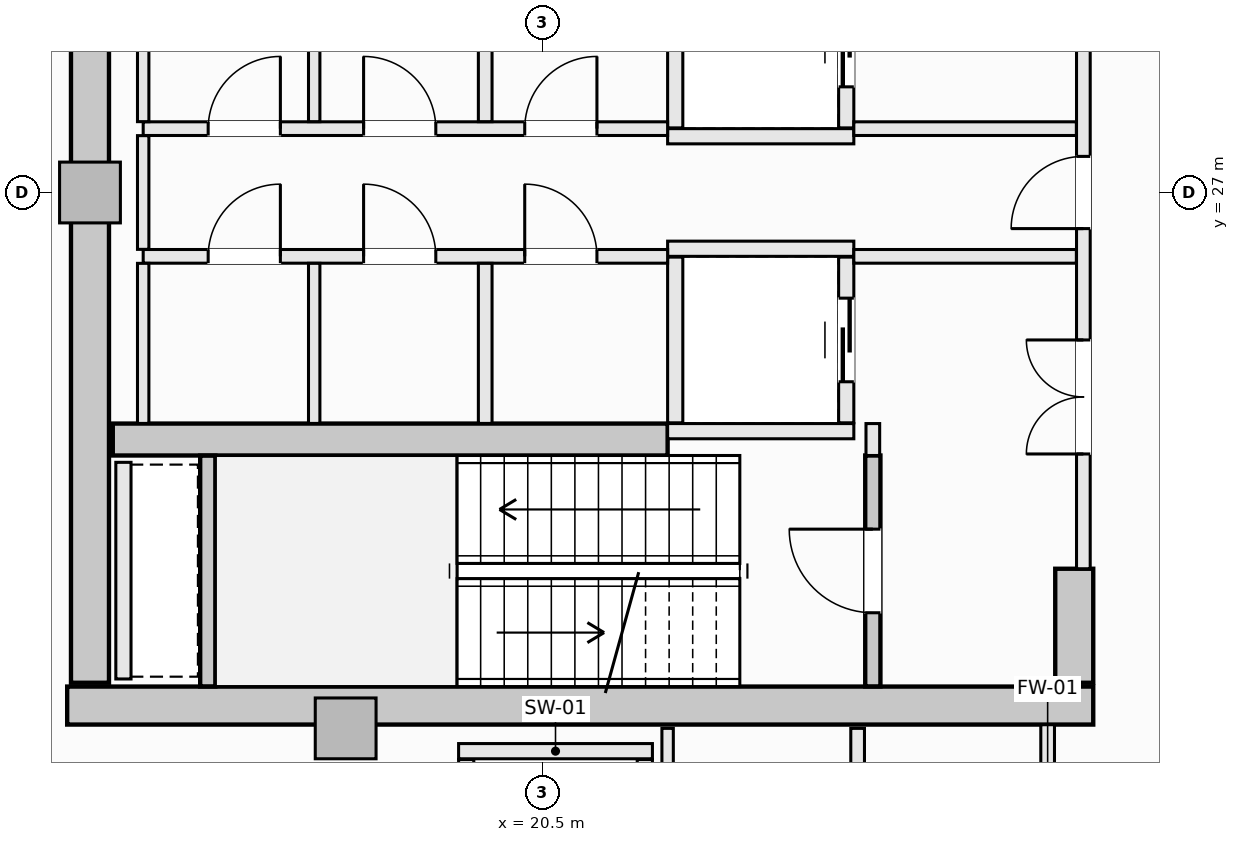
"""IFC4 building model, lengths in metres.
Left out: names, types, materials, properties, quantities, classifications, styles, units other than length and angle.
Written with IfcOpenShell. Run it as: python <this file> out.ifc"""

import sys

from ifc_helpers import new_model, si_unit, direction, frame, frame_2d, origin, origin_2d, place, context, subcontext, project, spatial, rectangle, extrude, element, fill, save


model = new_model("IFC4")
c1 = context("Model", 3, precision=1e-05, world=origin(), true_north=direction((0.0, 1.0)))
c2 = subcontext(c1, "Body", "Model", "MODEL_VIEW")
j1 = project(units=[si_unit("LENGTHUNIT", "METRE"), si_unit("PLANEANGLEUNIT", "RADIAN")], contexts=[c1])
p1 = place(None, origin())
s1 = spatial("IfcSite", under=j1, at=p1, CompositionType="ELEMENT")
p2 = place(p1, origin())
s2 = spatial("IfcBuilding", under=s1, at=p2, CompositionType="ELEMENT")
p3 = place(p2, frame((0.0, 0.0, 191.9)))
s3 = spatial("IfcBuildingStorey", under=s2, at=p3, CompositionType="ELEMENT", Elevation=191.9)
p4 = place(p3, frame((14.25, 20.25, -0.28), z_axis=(0.0, 0.0, 1.0), x_axis=(1.0, 0.0, 0.0)))
e1 = element("IfcWall", 1, at=p4, inside=s3, PredefinedType="SHEAR", context=c2, shape_type="SweptSolid", body=[
    extrude(rectangle(XDim=13.5, YDim=0.5, at=frame_2d((6.75, 0.0))), origin(), (0.0, 0.0, 1.0), 4.51),
])
p5 = place(p3, frame((14.55, 20.55, -0.28), z_axis=(0.0, 0.0, 1.0), x_axis=(0.0, 1.0, 0.0)))
e2 = element("IfcWall", 2, at=p5, inside=s3, PredefinedType="SHEAR", context=c2, shape_type="SweptSolid", body=[
    extrude(rectangle(XDim=12.9, YDim=0.5, at=frame_2d((6.45, 0.0))), origin(), (0.0, 0.0, 1.0), 4.51),
])
p6 = place(p3, frame((27.5, 20.55, -0.28), z_axis=(0.0, 0.0, 1.0), x_axis=(0.0, 1.0, 0.0)))
e3 = element("IfcWall", 3, at=p6, inside=s3, PredefinedType="SHEAR", context=c2, shape_type="SweptSolid", body=[
    extrude(rectangle(XDim=1.5, YDim=0.5, at=frame_2d((0.75, 0.0))), origin(), (0.0, 0.0, 1.0), 4.51),
])
p7 = place(p3, frame((14.85, 23.75, -0.28), z_axis=(0.0, 0.0, 1.0), x_axis=(1.0, 0.0, 0.0)))
e4 = element("IfcWall", 4, at=p7, inside=s3, PredefinedType="SHEAR", context=c2, shape_type="SweptSolid", body=[
    extrude(rectangle(XDim=7.3, YDim=0.42, at=frame_2d((3.65, 0.0))), origin(), (0.0, 0.0, 1.0), 4.51),
])
for number, where, z_axis, x_axis in (
    (5, (14.55, 27.0, -0.28), (0.0, 0.0, 1.0), (1.0, 0.0, 0.0)),
    (6, (17.914, 19.95, -0.28), (0.0, 0.0, 1.0), (1.0, 0.0, 0.0)),
):
    element("IfcColumn", number, at=place(p3, frame(where, z_axis=z_axis, x_axis=x_axis)), inside=s3, PredefinedType="PILASTER", context=c2, shape_type="SweptSolid", body=[
        extrude(rectangle(XDim=0.8, YDim=0.8, at=origin_2d()), origin(), (0.0, 0.0, 1.0), 4.51),
    ])
p8 = place(p3, frame((24.85, 20.502, -0.28), z_axis=(0.0, 0.0, 1.0), x_axis=(0.0, 1.0, 0.0)))
e7 = element("IfcWall", 7, at=p8, inside=s3, PredefinedType="SHEAR", context=c2, shape_type="SweptSolid", body=[
    extrude(rectangle(XDim=3.038, YDim=0.2, at=frame_2d((1.519, 0.0))), origin(), (0.0, 0.0, 1.0), 4.51),
])
p9 = place(p8, frame((0.969, 0.0, 0.28)))
e8 = element("IfcOpeningElement", 8, at=p9, cuts=e7, PredefinedType="OPENING", context=c2, shape_type="SweptSolid", body=[
    extrude(rectangle(XDim=1.1, YDim=2.15, at=frame_2d((0.55, 1.075))), frame((0.0, 0.11, 0.0), z_axis=(0.0, -1.0, 0.0), x_axis=(1.0, 0.0, 0.0)), (0.0, 0.0, 1.0), 0.22),
])
p10 = place(p3, frame((16.1, 20.502, -0.28), z_axis=(0.0, 0.0, 1.0), x_axis=(0.0, 1.0, 0.0)))
e9 = element("IfcWall", 9, at=p10, inside=s3, PredefinedType="SHEAR", context=c2, shape_type="SweptSolid", body=[
    extrude(rectangle(XDim=3.036, YDim=0.2, at=frame_2d((1.518, 0.0))), origin(), (0.0, 0.0, 1.0), 4.51),
])
p11 = place(p3, frame((22.15, 27.74, 0.0), z_axis=(0.0, 0.0, 1.0), x_axis=(1.0, 0.0, 0.0)))
e10 = element("IfcWall", 10, at=p11, inside=s3, PredefinedType="SOLIDWALL", context=c2, shape_type="SweptSolid", body=[
    extrude(rectangle(XDim=2.45, YDim=0.2, at=frame_2d((1.225, 0.0))), origin(), (0.0, 0.0, 1.0), 4.23),
])
p12 = place(p3, frame((22.25, 27.85, 0.0), z_axis=(0.0, 0.0, 1.0), x_axis=(0.0, 1.0, 0.0)))
e11 = element("IfcWall", 11, at=p12, inside=s3, PredefinedType="SOLIDWALL", context=c2, shape_type="SweptSolid", body=[
    extrude(rectangle(XDim=2.18, YDim=0.2, at=frame_2d((1.09, 0.0))), origin(), (0.0, 0.0, 1.0), 4.23),
])
p13 = place(p3, frame((24.5, 27.85, 0.0), z_axis=(0.0, 0.0, 1.0), x_axis=(0.0, 1.0, 0.0)))
e12 = element("IfcWall", 12, at=p13, inside=s3, PredefinedType="SOLIDWALL", context=c2, shape_type="SweptSolid", body=[
    extrude(rectangle(XDim=2.18, YDim=0.2, at=frame_2d((1.09, 0.0))), origin(), (0.0, 0.0, 1.0), 4.23),
])
p14 = place(p13, frame((0.54, 0.0, 0.0)))
e13 = element("IfcOpeningElement", 13, at=p14, cuts=e12, PredefinedType="OPENING", context=c2, shape_type="SweptSolid", body=[
    extrude(rectangle(XDim=1.1, YDim=2.2, at=frame_2d((0.55, 1.1))), frame((0.0, 0.11, 0.0), z_axis=(0.0, -1.0, 0.0), x_axis=(1.0, 0.0, 0.0)), (0.0, 0.0, 1.0), 0.22),
])
for number, where, z_axis, x_axis in (
    (14, (22.15, 26.26, 0.0), (0.0, 0.0, 1.0), (1.0, 0.0, 0.0)),
    (15, (22.15, 23.86, 0.0), (0.0, 0.0, 1.0), (1.0, 0.0, 0.0)),
):
    element("IfcWall", number, at=place(p3, frame(where, z_axis=z_axis, x_axis=x_axis)), inside=s3, PredefinedType="SOLIDWALL", context=c2, shape_type="SweptSolid", body=[
        extrude(rectangle(XDim=2.45, YDim=0.2, at=frame_2d((1.225, 0.0))), origin(), (0.0, 0.0, 1.0), 4.23),
    ])
p15 = place(p3, frame((22.25, 23.97, 0.0), z_axis=(0.0, 0.0, 1.0), x_axis=(0.0, 1.0, 0.0)))
e16 = element("IfcWall", 16, at=p15, inside=s3, PredefinedType="SOLIDWALL", context=c2, shape_type="SweptSolid", body=[
    extrude(rectangle(XDim=2.18, YDim=0.2, at=frame_2d((1.09, 0.0))), origin(), (0.0, 0.0, 1.0), 4.23),
])
p16 = place(p3, frame((24.5, 23.97, 0.0), z_axis=(0.0, 0.0, 1.0), x_axis=(0.0, 1.0, 0.0)))
e17 = element("IfcWall", 17, at=p16, inside=s3, PredefinedType="SOLIDWALL", context=c2, shape_type="SweptSolid", body=[
    extrude(rectangle(XDim=2.18, YDim=0.2, at=frame_2d((1.09, 0.0))), origin(), (0.0, 0.0, 1.0), 4.23),
])
p17 = place(p16, frame((0.54, 0.0, 0.0)))
e18 = element("IfcOpeningElement", 18, at=p17, cuts=e17, PredefinedType="OPENING", context=c2, shape_type="SweptSolid", body=[
    extrude(rectangle(XDim=1.1, YDim=2.2, at=frame_2d((0.55, 1.1))), frame((0.0, 0.11, 0.0), z_axis=(0.0, -1.0, 0.0), x_axis=(1.0, 0.0, 0.0)), (0.0, 0.0, 1.0), 0.22),
])
p18 = place(p3, frame((19.4, 19.65, 0.0), z_axis=(0.0, 0.0, 1.0), x_axis=(1.0, 0.0, 0.0)))
e19 = element("IfcWall", 19, at=p18, inside=s3, PredefinedType="SOLIDWALL", context=c2, shape_type="SweptSolid", body=[
    extrude(rectangle(XDim=2.55, YDim=0.2, at=frame_2d((1.275, 0.0))), origin(), (0.0, 0.0, 1.0), 4.23),
])
for number, where, z_axis, x_axis in (
    (20, (19.5, 17.01, 0.0), (0.0, 0.0, 1.0), (0.0, 1.0, 0.0)),
    (21, (21.85, 17.01, 0.0), (0.0, 0.0, 1.0), (0.0, 1.0, 0.0)),
):
    element("IfcWall", number, at=place(p3, frame(where, z_axis=z_axis, x_axis=x_axis)), inside=s3, PredefinedType="SOLIDWALL", context=c2, shape_type="SweptSolid", body=[
        extrude(rectangle(XDim=2.53, YDim=0.2, at=frame_2d((1.265, 0.0))), origin(), (0.0, 0.0, 1.0), 4.23),
    ])
p19 = place(p3, frame((14.99, 20.6, 0.0), z_axis=(0.0, 0.0, 1.0), x_axis=(0.0, 1.0, 0.0)))
e22 = element("IfcWall", 22, at=p19, inside=s3, PredefinedType="SOLIDWALL", context=c2, shape_type="SweptSolid", body=[
    extrude(rectangle(XDim=2.85, YDim=0.2, at=frame_2d((1.425, 0.0))), origin(), (0.0, 0.0, 1.0), 4.23),
])
p20 = place(p3, frame((24.85, 23.54, 0.0), z_axis=(0.0, 0.0, 1.0), x_axis=(0.0, 1.0, 0.0)))
e23 = element("IfcWall", 23, at=p20, inside=s3, PredefinedType="SOLIDWALL", context=c2, shape_type="SweptSolid", body=[
    extrude(rectangle(XDim=0.42, YDim=0.18, at=frame_2d((0.21, 0.0))), origin(), (0.0, 0.0, 1.0), 4.23),
])
p21 = place(p3, frame((27.62, 22.05, 0.0), z_axis=(0.0, 0.0, 1.0), x_axis=(0.0, 1.0, 0.0)))
e24 = element("IfcWall", 24, at=p21, inside=s3, PredefinedType="SOLIDWALL", context=c2, shape_type="SweptSolid", body=[
    extrude(rectangle(XDim=9.9, YDim=0.18, at=frame_2d((4.95, 0.0))), origin(), (0.0, 0.0, 1.0), 3.322),
])
p22 = place(p21, frame((4.475, 0.0, 0.0)))
e25 = element("IfcOpeningElement", 25, at=p22, cuts=e24, PredefinedType="OPENING", context=c2, shape_type="SweptSolid", body=[
    extrude(rectangle(XDim=0.95, YDim=2.1, at=frame_2d((0.475, 1.05))), frame((0.0, 0.1, 0.0), z_axis=(0.0, -1.0, 0.0), x_axis=(1.0, 0.0, 0.0)), (0.0, 0.0, 1.0), 0.2),
])
p23 = place(p21, frame((6.89, 0.0, 0.0)))
e26 = element("IfcOpeningElement", 26, at=p23, cuts=e24, PredefinedType="OPENING", context=c2, shape_type="SweptSolid", body=[
    extrude(rectangle(XDim=1.5, YDim=2.2, at=frame_2d((0.75, 1.1))), frame((0.0, 0.1, 0.0), z_axis=(0.0, -1.0, 0.0), x_axis=(1.0, 0.0, 0.0)), (0.0, 0.0, 1.0), 0.2),
])
p24 = place(p21, frame((1.51, 0.0, 0.0)))
e27 = element("IfcOpeningElement", 27, at=p24, cuts=e24, PredefinedType="OPENING", context=c2, shape_type="SweptSolid", body=[
    extrude(rectangle(XDim=1.5, YDim=2.2, at=frame_2d((0.75, 1.1))), frame((0.0, 0.1, 0.0), z_axis=(0.0, -1.0, 0.0), x_axis=(1.0, 0.0, 0.0)), (0.0, 0.0, 1.0), 0.2),
])
p25 = place(p3, frame((15.25, 27.84, 0.0), z_axis=(0.0, 0.0, 1.0), x_axis=(1.0, 0.0, 0.0)))
e28 = element("IfcWall", 28, at=p25, inside=s3, PredefinedType="SOLIDWALL", context=c2, shape_type="SweptSolid", body=[
    extrude(rectangle(XDim=6.9, YDim=0.18, at=frame_2d((3.45, 0.0))), origin(), (0.0, 0.0, 1.0), 4.23),
])
p26 = place(p25, frame((5.02, 0.0, 0.0)))
e29 = element("IfcOpeningElement", 29, at=p26, cuts=e28, PredefinedType="OPENING", context=c2, shape_type="SweptSolid", body=[
    extrude(rectangle(XDim=0.95, YDim=2.1, at=frame_2d((0.475, 1.05))), frame((0.0, 0.1, 0.0), z_axis=(0.0, -1.0, 0.0), x_axis=(1.0, 0.0, 0.0)), (0.0, 0.0, 1.0), 0.2),
])
p27 = place(p25, frame((0.855, 0.0, 0.0)))
e30 = element("IfcOpeningElement", 30, at=p27, cuts=e28, PredefinedType="OPENING", context=c2, shape_type="SweptSolid", body=[
    extrude(rectangle(XDim=0.95, YDim=2.1, at=frame_2d((0.475, 1.05))), frame((0.0, 0.1, 0.0), z_axis=(0.0, -1.0, 0.0), x_axis=(1.0, 0.0, 0.0)), (0.0, 0.0, 1.0), 0.2),
])
p28 = place(p25, frame((2.9, 0.0, 0.0)))
e31 = element("IfcOpeningElement", 31, at=p28, cuts=e28, PredefinedType="OPENING", context=c2, shape_type="SweptSolid", body=[
    extrude(rectangle(XDim=0.95, YDim=2.1, at=frame_2d((0.475, 1.05))), frame((0.0, 0.1, 0.0), z_axis=(0.0, -1.0, 0.0), x_axis=(1.0, 0.0, 0.0)), (0.0, 0.0, 1.0), 0.2),
])
p29 = place(p3, frame((24.6, 27.84, 0.0), z_axis=(0.0, 0.0, 1.0), x_axis=(1.0, 0.0, 0.0)))
e32 = element("IfcWall", 32, at=p29, inside=s3, PredefinedType="SOLIDWALL", context=c2, shape_type="SweptSolid", body=[
    extrude(rectangle(XDim=2.928, YDim=0.18, at=frame_2d((1.464, 0.0))), origin(), (0.0, 0.0, 1.0), 4.23),
])
p30 = place(p3, frame((15.25, 26.16, 0.0), z_axis=(0.0, 0.0, 1.0), x_axis=(1.0, 0.0, 0.0)))
e33 = element("IfcWall", 33, at=p30, inside=s3, PredefinedType="SOLIDWALL", context=c2, shape_type="SweptSolid", body=[
    extrude(rectangle(XDim=6.9, YDim=0.18, at=frame_2d((3.45, 0.0))), origin(), (0.0, 0.0, 1.0), 4.23),
])
p31 = place(p30, frame((5.02, 0.0, 0.0)))
e34 = element("IfcOpeningElement", 34, at=p31, cuts=e33, PredefinedType="OPENING", context=c2, shape_type="SweptSolid", body=[
    extrude(rectangle(XDim=0.95, YDim=2.1, at=frame_2d((0.475, 1.05))), frame((0.0, 0.1, 0.0), z_axis=(0.0, -1.0, 0.0), x_axis=(1.0, 0.0, 0.0)), (0.0, 0.0, 1.0), 0.2),
])
p32 = place(p30, frame((0.855, 0.0, 0.0)))
e35 = element("IfcOpeningElement", 35, at=p32, cuts=e33, PredefinedType="OPENING", context=c2, shape_type="SweptSolid", body=[
    extrude(rectangle(XDim=0.95, YDim=2.1, at=frame_2d((0.475, 1.05))), frame((0.0, 0.1, 0.0), z_axis=(0.0, -1.0, 0.0), x_axis=(1.0, 0.0, 0.0)), (0.0, 0.0, 1.0), 0.2),
])
p33 = place(p30, frame((2.9, 0.0, 0.0)))
e36 = element("IfcOpeningElement", 36, at=p33, cuts=e33, PredefinedType="OPENING", context=c2, shape_type="SweptSolid", body=[
    extrude(rectangle(XDim=0.95, YDim=2.1, at=frame_2d((0.475, 1.05))), frame((0.0, 0.1, 0.0), z_axis=(0.0, -1.0, 0.0), x_axis=(1.0, 0.0, 0.0)), (0.0, 0.0, 1.0), 0.2),
])
p34 = place(p3, frame((24.6, 26.16, 0.0), z_axis=(0.0, 0.0, 1.0), x_axis=(1.0, 0.0, 0.0)))
e37 = element("IfcWall", 37, at=p34, inside=s3, PredefinedType="SOLIDWALL", context=c2, shape_type="SweptSolid", body=[
    extrude(rectangle(XDim=2.928, YDim=0.18, at=frame_2d((1.464, 0.0))), origin(), (0.0, 0.0, 1.0), 4.23),
])
p35 = place(p3, frame((15.25, 23.962, 0.0), z_axis=(0.0, 0.0, 1.0), x_axis=(0.0, 1.0, 0.0)))
e38 = element("IfcWall", 38, at=p35, inside=s3, PredefinedType="PARTITIONING", context=c2, shape_type="SweptSolid", body=[
    extrude(rectangle(XDim=2.106, YDim=0.15, at=frame_2d((1.053, 0.0))), origin(), (0.0, 0.0, 1.0), 4.23),
])
p36 = place(p3, frame((15.25, 26.252, 0.0), z_axis=(0.0, 0.0, 1.0), x_axis=(0.0, 1.0, 0.0)))
e39 = element("IfcWall", 39, at=p36, inside=s3, PredefinedType="PARTITIONING", context=c2, shape_type="SweptSolid", body=[
    extrude(rectangle(XDim=1.496, YDim=0.15, at=frame_2d((0.748, 0.0))), origin(), (0.0, 0.0, 1.0), 4.23),
])
p37 = place(p3, frame((15.25, 27.932, 0.0), z_axis=(0.0, 0.0, 1.0), x_axis=(0.0, 1.0, 0.0)))
e40 = element("IfcWall", 40, at=p37, inside=s3, PredefinedType="PARTITIONING", context=c2, shape_type="SweptSolid", body=[
    extrude(rectangle(XDim=2.106, YDim=0.15, at=frame_2d((1.053, 0.0))), origin(), (0.0, 0.0, 1.0), 4.23),
])
for number, where, z_axis, x_axis in (
    (41, (19.75, 23.962, 0.0), (0.0, 0.0, 1.0), (0.0, 1.0, 0.0)),
    (42, (19.75, 27.932, 0.0), (0.0, 0.0, 1.0), (0.0, 1.0, 0.0)),
):
    element("IfcWall", number, at=place(p3, frame(where, z_axis=z_axis, x_axis=x_axis)), inside=s3, PredefinedType="SOLIDWALL", context=c2, shape_type="SweptSolid", body=[
        extrude(rectangle(XDim=2.106, YDim=0.18, at=frame_2d((1.053, 0.0))), origin(), (0.0, 0.0, 1.0), 4.23),
    ])
for number, where, z_axis, x_axis in (
    (43, (17.5, 23.962, 0.0), (0.0, 0.0, 1.0), (0.0, 1.0, 0.0)),
    (44, (17.5, 27.932, 0.0), (0.0, 0.0, 1.0), (0.0, 1.0, 0.0)),
):
    element("IfcWall", number, at=place(p3, frame(where, z_axis=z_axis, x_axis=x_axis)), inside=s3, PredefinedType="PARTITIONING", context=c2, shape_type="SweptSolid", body=[
        extrude(rectangle(XDim=2.106, YDim=0.15, at=frame_2d((1.053, 0.0))), origin(), (0.0, 0.0, 1.0), 4.23),
    ])
p38 = place(p3, frame((22.15, 17.142, 0.0), z_axis=(0.0, 0.0, 1.0), x_axis=(0.0, 1.0, 0.0)))
e45 = element("IfcWall", 45, at=p38, inside=s3, PredefinedType="PARTITIONING", context=c2, shape_type="SweptSolid", body=[
    extrude(rectangle(XDim=2.808, YDim=0.15, at=frame_2d((1.404, 0.0))), origin(), (0.0, 0.0, 1.0), 4.23),
])
p39 = place(p3, frame((24.65, 17.142, 0.0), z_axis=(0.0, 0.0, 1.0), x_axis=(0.0, 1.0, 0.0)))
e46 = element("IfcWall", 46, at=p39, inside=s3, PredefinedType="SOLIDWALL", context=c2, shape_type="SweptSolid", body=[
    extrude(rectangle(XDim=2.808, YDim=0.18, at=frame_2d((1.404, 0.0))), origin(), (0.0, 0.0, 1.0), 4.23),
])
p40 = place(p3, frame((27.15, 17.142, 0.0), z_axis=(0.0, 0.0, 1.0), x_axis=(0.0, 1.0, 0.0)))
e47 = element("IfcWall", 47, at=p40, inside=s3, PredefinedType="SOLIDWALL", context=c2, shape_type="SweptSolid", body=[
    extrude(rectangle(XDim=2.856, YDim=0.18, at=frame_2d((1.428, 0.0))), origin(), (0.0, 0.0, 1.0), 4.23),
])
p41 = place(p40, frame((0.953, 0.0, 0.0)))
e48 = element("IfcOpeningElement", 48, at=p41, cuts=e47, PredefinedType="OPENING", context=c2, shape_type="SweptSolid", body=[
    extrude(rectangle(XDim=0.95, YDim=2.1, at=frame_2d((0.475, 1.05))), frame((0.0, 0.1, 0.0), z_axis=(0.0, -1.0, 0.0), x_axis=(1.0, 0.0, 0.0)), (0.0, 0.0, 1.0), 0.2),
])
p42 = place(p9, origin())
e49 = element("IfcDoor", 49, at=p42, inside=s3, OperationType="SINGLE_SWING_RIGHT", PredefinedType="DOOR", context=c2, shape_type="SweptSolid", body=[
    extrude(rectangle(XDim=1.1, YDim=2.15, at=frame_2d((0.55, 1.075))), frame((0.0, 0.025, 0.0), z_axis=(0.0, -1.0, 0.0), x_axis=(1.0, 0.0, 0.0)), (0.0, 0.0, 1.0), 0.05),
])
fill(e8, e49)
p43 = place(p14, origin())
e50 = element("IfcDoor", 50, at=p43, inside=s3, OperationType="SLIDING_TO_LEFT", PredefinedType="DOOR", context=c2, shape_type="SweptSolid", body=[
    extrude(rectangle(XDim=1.1, YDim=2.2, at=frame_2d((0.55, 1.1))), frame((0.0, 0.025, 0.0), z_axis=(0.0, -1.0, 0.0), x_axis=(1.0, 0.0, 0.0)), (0.0, 0.0, 1.0), 0.05),
])
fill(e13, e50)
p44 = place(p17, origin())
e51 = element("IfcDoor", 51, at=p44, inside=s3, OperationType="SLIDING_TO_LEFT", PredefinedType="DOOR", context=c2, shape_type="SweptSolid", body=[
    extrude(rectangle(XDim=1.1, YDim=2.2, at=frame_2d((0.55, 1.1))), frame((0.0, 0.025, 0.0), z_axis=(0.0, -1.0, 0.0), x_axis=(1.0, 0.0, 0.0)), (0.0, 0.0, 1.0), 0.05),
])
fill(e18, e51)
p45 = place(p22, origin())
e52 = element("IfcDoor", 52, at=p45, inside=s3, OperationType="SINGLE_SWING_LEFT", PredefinedType="DOOR", context=c2, shape_type="SweptSolid", body=[
    extrude(rectangle(XDim=0.95, YDim=2.1, at=frame_2d((0.475, 1.05))), frame((0.0, 0.025, 0.0), z_axis=(0.0, -1.0, 0.0), x_axis=(1.0, 0.0, 0.0)), (0.0, 0.0, 1.0), 0.05),
])
fill(e25, e52)
p46 = place(p24, origin())
e53 = element("IfcDoor", 53, at=p46, inside=s3, OperationType="DOUBLE_DOOR_SINGLE_SWING", PredefinedType="DOOR", context=c2, shape_type="SweptSolid", body=[
    extrude(rectangle(XDim=1.5, YDim=2.2, at=frame_2d((0.75, 1.1))), frame((0.0, 0.025, 0.0), z_axis=(0.0, -1.0, 0.0), x_axis=(1.0, 0.0, 0.0)), (0.0, 0.0, 1.0), 0.05),
])
fill(e27, e53)
p47 = place(p26, origin())
e54 = element("IfcDoor", 54, at=p47, inside=s3, OperationType="SINGLE_SWING_RIGHT", PredefinedType="DOOR", context=c2, shape_type="SweptSolid", body=[
    extrude(rectangle(XDim=0.95, YDim=2.1, at=frame_2d((0.475, 1.05))), frame((0.0, 0.025, 0.0), z_axis=(0.0, -1.0, 0.0), x_axis=(1.0, 0.0, 0.0)), (0.0, 0.0, 1.0), 0.05),
])
fill(e29, e54)
p48 = place(p31, origin())
e55 = element("IfcDoor", 55, at=p48, inside=s3, OperationType="SINGLE_SWING_LEFT", PredefinedType="DOOR", context=c2, shape_type="SweptSolid", body=[
    extrude(rectangle(XDim=0.95, YDim=2.1, at=frame_2d((0.475, 1.05))), frame((0.0, 0.025, 0.0), z_axis=(0.0, -1.0, 0.0), x_axis=(1.0, 0.0, 0.0)), (0.0, 0.0, 1.0), 0.05),
])
fill(e34, e55)
p49 = place(p27, origin())
e56 = element("IfcDoor", 56, at=p49, inside=s3, OperationType="SINGLE_SWING_RIGHT", PredefinedType="DOOR", context=c2, shape_type="SweptSolid", body=[
    extrude(rectangle(XDim=0.95, YDim=2.1, at=frame_2d((0.475, 1.05))), frame((0.0, 0.025, 0.0), z_axis=(0.0, -1.0, 0.0), x_axis=(1.0, 0.0, 0.0)), (0.0, 0.0, 1.0), 0.05),
])
fill(e30, e56)
p50 = place(p28, origin())
e57 = element("IfcDoor", 57, at=p50, inside=s3, OperationType="SINGLE_SWING_LEFT", PredefinedType="DOOR", context=c2, shape_type="SweptSolid", body=[
    extrude(rectangle(XDim=0.95, YDim=2.1, at=frame_2d((0.475, 1.05))), frame((0.0, 0.025, 0.0), z_axis=(0.0, -1.0, 0.0), x_axis=(1.0, 0.0, 0.0)), (0.0, 0.0, 1.0), 0.05),
])
fill(e31, e57)
p51 = place(p32, origin())
e58 = element("IfcDoor", 58, at=p51, inside=s3, OperationType="SINGLE_SWING_RIGHT", PredefinedType="DOOR", context=c2, shape_type="SweptSolid", body=[
    extrude(rectangle(XDim=0.95, YDim=2.1, at=frame_2d((0.475, 1.05))), frame((0.0, 0.025, 0.0), z_axis=(0.0, -1.0, 0.0), x_axis=(1.0, 0.0, 0.0)), (0.0, 0.0, 1.0), 0.05),
])
fill(e35, e58)
p52 = place(p33, origin())
e59 = element("IfcDoor", 59, at=p52, inside=s3, OperationType="SINGLE_SWING_LEFT", PredefinedType="DOOR", context=c2, shape_type="SweptSolid", body=[
    extrude(rectangle(XDim=0.95, YDim=2.1, at=frame_2d((0.475, 1.05))), frame((0.0, 0.025, 0.0), z_axis=(0.0, -1.0, 0.0), x_axis=(1.0, 0.0, 0.0)), (0.0, 0.0, 1.0), 0.05),
])
fill(e36, e59)
save(model, sys.argv[1])
